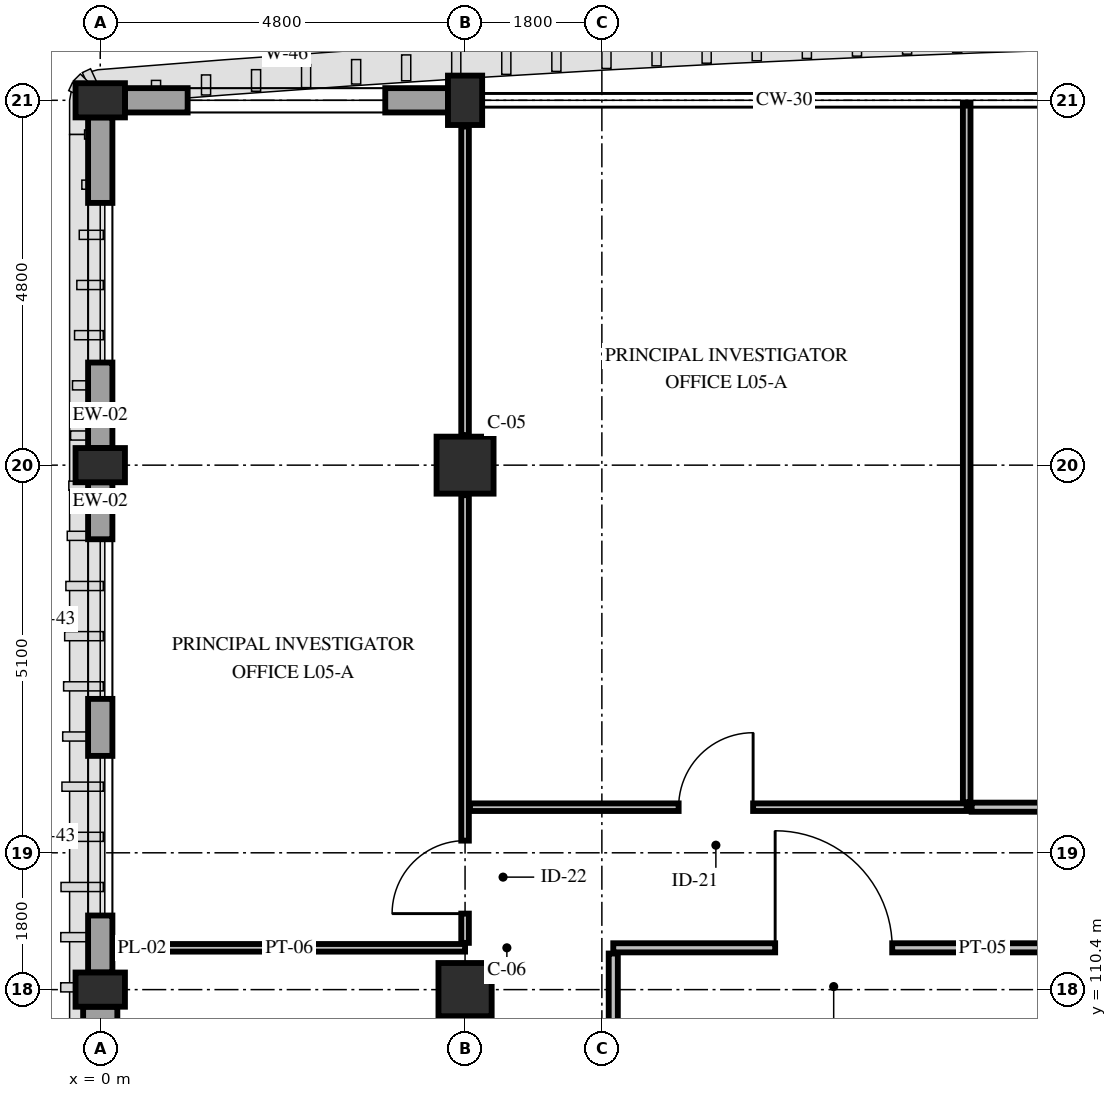
"""IFC4 building model, lengths in metres.
Left out: names, types, materials, properties, quantities, classifications, styles, units other than length and angle.
Written with IfcOpenShell. Run it as: python <this file> out.ifc"""

import sys

from ifc_helpers import new_model, si_unit, direction, frame, frame_2d, origin, origin_2d, place, context, subcontext, project, spatial, rectangle, extrude, element, fill, save


model = new_model("IFC4")
c1 = context("Model", 3, precision=1e-05, world=origin(), true_north=direction((0.0, 1.0)))
c2 = subcontext(c1, "Body", "Model", "MODEL_VIEW")
j1 = project(units=[si_unit("LENGTHUNIT", "METRE"), si_unit("PLANEANGLEUNIT", "RADIAN")], contexts=[c1])
p1 = place(None, origin())
s1 = spatial("IfcSite", under=j1, at=p1, CompositionType="ELEMENT")
p2 = place(p1, origin())
s2 = spatial("IfcBuilding", under=s1, at=p2, CompositionType="ELEMENT")
p3 = place(p2, frame((0.0, 0.0, 24.6)))
s3 = spatial("IfcBuildingStorey", under=s2, at=p3, CompositionType="ELEMENT", Elevation=24.6)
for number, where, z_axis, x_axis in (
    (1, (0.0, 110.4, 0.0), (0.0, 0.0, 1.0), (0.0, 1.0, 0.0)),
    (2, (0.0, 117.3, 0.0), (0.0, 0.0, 1.0), (0.0, 1.0, 0.0)),
    (3, (0.0, 122.1, 0.0), (0.0, 0.0, 1.0), (0.0, 1.0, 0.0)),
):
    element("IfcColumn", number, at=place(p3, frame(where, z_axis=z_axis, x_axis=x_axis)), inside=s3, PredefinedType="PILASTER", context=c2, shape_type="SweptSolid", body=[
        extrude(rectangle(XDim=0.45, YDim=0.65, at=origin_2d()), origin(), (0.0, 0.0, 1.0), 4.8),
    ])
p4 = place(p3, frame((4.8, 110.4, 0.0), z_axis=(0.0, 0.0, 1.0), x_axis=(1.0, 0.0, 0.0)))
e4 = element("IfcColumn", 4, at=p4, inside=s3, PredefinedType="COLUMN", context=c2, shape_type="SweptSolid", body=[
    extrude(rectangle(XDim=0.7, YDim=0.7, at=origin_2d()), origin(), (0.0, 0.0, 1.0), 4.8),
])
p5 = place(p3, frame((4.8, 117.3, 0.0), z_axis=(0.0, 0.0, 1.0), x_axis=(1.0, 0.0, 0.0)))
e5 = element("IfcColumn", 5, at=p5, inside=s3, PredefinedType="COLUMN", context=c2, shape_type="SweptSolid", body=[
    extrude(rectangle(XDim=0.75, YDim=0.75, at=origin_2d()), origin(), (0.0, 0.0, 1.0), 4.8),
])
p6 = place(p3, frame((4.8, 122.1, 0.0), z_axis=(0.0, 0.0, 1.0), x_axis=(1.0, 0.0, 0.0)))
e6 = element("IfcColumn", 6, at=p6, inside=s3, PredefinedType="PILASTER", context=c2, shape_type="SweptSolid", body=[
    extrude(rectangle(XDim=0.45, YDim=0.65, at=origin_2d()), origin(), (0.0, 0.0, 1.0), 4.8),
])
p7 = place(p3, frame((0.0, 104.025, 0.0), z_axis=(0.0, 0.0, 1.0), x_axis=(0.0, 1.0, 0.0)))
e7 = element("IfcWall", 7, at=p7, inside=s3, PredefinedType="SOLIDWALL", context=c2, shape_type="SweptSolid", body=[
    extrude(rectangle(XDim=6.15, YDim=0.45, at=frame_2d((3.075, 0.0))), origin(), (0.0, 0.0, 1.0), 3.95),
])
p8 = place(p3, frame((0.0, 110.625, 0.0), z_axis=(0.0, 0.0, 1.0), x_axis=(0.0, 1.0, 0.0)))
e8 = element("IfcWall", 8, at=p8, inside=s3, PredefinedType="STANDARD", context=c2, shape_type="SweptSolid", body=[
    extrude(rectangle(XDim=6.45, YDim=0.32, at=frame_2d((3.225, 0.0))), origin(), (0.0, 0.0, 1.0), 3.95),
])
p9 = place(p8, frame((0.75, 0.0, 0.85)))
e9 = element("IfcOpeningElement", 9, at=p9, cuts=e8, PredefinedType="OPENING", context=c2, shape_type="SweptSolid", body=[
    extrude(rectangle(XDim=2.1, YDim=2.08, at=frame_2d((1.05, 1.04))), frame((0.0, 0.175, 0.0), z_axis=(0.0, -1.0, 0.0), x_axis=(1.0, 0.0, 0.0)), (0.0, 0.0, 1.0), 0.35),
])
p10 = place(p8, frame((3.6, 0.0, 0.85)))
e10 = element("IfcOpeningElement", 10, at=p10, cuts=e8, PredefinedType="OPENING", context=c2, shape_type="SweptSolid", body=[
    extrude(rectangle(XDim=2.1, YDim=2.08, at=frame_2d((1.05, 1.04))), frame((0.0, 0.175, 0.0), z_axis=(0.0, -1.0, 0.0), x_axis=(1.0, 0.0, 0.0)), (0.0, 0.0, 1.0), 0.35),
])
p11 = place(p3, frame((0.0, 117.525, 0.0), z_axis=(0.0, 0.0, 1.0), x_axis=(0.0, 1.0, 0.0)))
e11 = element("IfcWall", 11, at=p11, inside=s3, PredefinedType="STANDARD", context=c2, shape_type="SweptSolid", body=[
    extrude(rectangle(XDim=4.35, YDim=0.32, at=frame_2d((2.175, 0.0))), origin(), (0.0, 0.0, 1.0), 3.95),
])
p12 = place(p11, frame((1.125, 0.0, 0.85)))
e12 = element("IfcOpeningElement", 12, at=p12, cuts=e11, PredefinedType="OPENING", context=c2, shape_type="SweptSolid", body=[
    extrude(rectangle(XDim=2.1, YDim=2.08, at=frame_2d((1.05, 1.04))), frame((0.0, 0.175, 0.0), z_axis=(0.0, -1.0, 0.0), x_axis=(1.0, 0.0, 0.0)), (0.0, 0.0, 1.0), 0.35),
])
p13 = place(p3, frame((0.325, 122.1, 0.0), z_axis=(0.0, 0.0, 1.0), x_axis=(1.0, 0.0, 0.0)))
e13 = element("IfcWall", 13, at=p13, inside=s3, PredefinedType="STANDARD", context=c2, shape_type="SweptSolid", body=[
    extrude(rectangle(XDim=4.25, YDim=0.32, at=frame_2d((2.125, 0.0))), origin(), (0.0, 0.0, 1.0), 3.95),
])
p14 = place(p13, frame((0.825, 0.0, 0.85)))
e14 = element("IfcOpeningElement", 14, at=p14, cuts=e13, PredefinedType="OPENING", context=c2, shape_type="SweptSolid", body=[
    extrude(rectangle(XDim=2.6, YDim=2.08, at=frame_2d((1.3, 1.04))), frame((0.0, 0.175, 0.0), z_axis=(0.0, -1.0, 0.0), x_axis=(1.0, 0.0, 0.0)), (0.0, 0.0, 1.0), 0.35),
])
p15 = place(p3, frame((6.75, 110.95, 0.0), z_axis=(0.0, 0.0, 1.0), x_axis=(1.0, 0.0, 0.0)))
e15 = element("IfcWall", 15, at=p15, inside=s3, PredefinedType="PARTITIONING", context=c2, shape_type="SweptSolid", body=[
    extrude(rectangle(XDim=5.8, YDim=0.12, at=frame_2d((2.9, 0.0))), origin(), (0.0, 0.0, 1.0), 4.345),
])
p16 = place(p15, frame((2.13, 0.0, 0.0)))
e16 = element("IfcOpeningElement", 16, at=p16, cuts=e15, PredefinedType="OPENING", context=c2, shape_type="SweptSolid", body=[
    extrude(rectangle(XDim=1.54, YDim=2.25, at=frame_2d((0.77, 1.125))), frame((0.0, 0.075, 0.0), z_axis=(0.0, -1.0, 0.0), x_axis=(1.0, 0.0, 0.0)), (0.0, 0.0, 1.0), 0.15),
])
p17 = place(p3, frame((6.75, 104.575, 0.0), z_axis=(0.0, 0.0, 1.0), x_axis=(0.0, 1.0, 0.0)))
e17 = element("IfcWall", 17, at=p17, inside=s3, PredefinedType="PARTITIONING", context=c2, shape_type="SweptSolid", body=[
    extrude(rectangle(XDim=6.3, YDim=0.12, at=frame_2d((3.15, 0.0))), origin(), (0.0, 0.0, 1.0), 3.83),
])
p18 = place(p3, frame((0.175, 110.95, 0.0), z_axis=(0.0, 0.0, 1.0), x_axis=(1.0, 0.0, 0.0)))
e18 = element("IfcWall", 18, at=p18, inside=s3, PredefinedType="PARTITIONING", context=c2, shape_type="SweptSolid", body=[
    extrude(rectangle(XDim=4.625, YDim=0.1, at=frame_2d((2.312, 0.0))), origin(), (0.0, 0.0, 1.0), 4.08),
])
p19 = place(p3, frame((4.8, 111.015, 0.0), z_axis=(0.0, 0.0, 1.0), x_axis=(0.0, 1.0, 0.0)))
e19 = element("IfcWall", 19, at=p19, inside=s3, PredefinedType="PARTITIONING", context=c2, shape_type="SweptSolid", body=[
    extrude(rectangle(XDim=5.89, YDim=0.1, at=frame_2d((2.945, 0.0))), origin(), (0.0, 0.0, 1.0), 4.13),
])
p20 = place(p19, frame((0.385, 0.0, 0.0)))
e20 = element("IfcOpeningElement", 20, at=p20, cuts=e19, PredefinedType="OPENING", context=c2, shape_type="SweptSolid", body=[
    extrude(rectangle(XDim=0.96, YDim=2.15, at=frame_2d((0.48, 1.075))), frame((0.0, 0.065, 0.0), z_axis=(0.0, -1.0, 0.0), x_axis=(1.0, 0.0, 0.0)), (0.0, 0.0, 1.0), 0.13),
])
p21 = place(p3, frame((4.8, 117.695, 0.0), z_axis=(0.0, 0.0, 1.0), x_axis=(0.0, 1.0, 0.0)))
e21 = element("IfcWall", 21, at=p21, inside=s3, PredefinedType="PARTITIONING", context=c2, shape_type="SweptSolid", body=[
    extrude(rectangle(XDim=4.06, YDim=0.1, at=frame_2d((2.03, 0.0))), origin(), (0.0, 0.0, 1.0), 4.13),
])
p22 = place(p3, frame((4.865, 112.8, 0.0), z_axis=(0.0, 0.0, 1.0), x_axis=(1.0, 0.0, 0.0)))
e22 = element("IfcWall", 22, at=p22, inside=s3, PredefinedType="PARTITIONING", context=c2, shape_type="SweptSolid", body=[
    extrude(rectangle(XDim=6.535, YDim=0.1, at=frame_2d((3.268, 0.0))), origin(), (0.0, 0.0, 1.0), 4.13),
])
p23 = place(p22, frame((2.745, 0.0, 0.0)))
e23 = element("IfcOpeningElement", 23, at=p23, cuts=e22, PredefinedType="OPENING", context=c2, shape_type="SweptSolid", body=[
    extrude(rectangle(XDim=0.98, YDim=2.2, at=frame_2d((0.49, 1.1))), frame((0.0, 0.065, 0.0), z_axis=(0.0, -1.0, 0.0), x_axis=(1.0, 0.0, 0.0)), (0.0, 0.0, 1.0), 0.13),
])
p24 = place(p3, frame((11.4, 112.865, 0.0), z_axis=(0.0, 0.0, 1.0), x_axis=(0.0, 1.0, 0.0)))
e24 = element("IfcWall", 24, at=p24, inside=s3, PredefinedType="PARTITIONING", context=c2, shape_type="SweptSolid", body=[
    extrude(rectangle(XDim=9.195, YDim=0.1, at=frame_2d((4.598, 0.0))), origin(), (0.0, 0.0, 1.0), 3.83),
])
p25 = place(p3, frame((11.465, 112.8, 0.0), z_axis=(0.0, 0.0, 1.0), x_axis=(1.0, 0.0, 0.0)))
e25 = element("IfcWall", 25, at=p25, inside=s3, PredefinedType="PARTITIONING", context=c2, shape_type="SweptSolid", body=[
    extrude(rectangle(XDim=11.735, YDim=0.12, at=frame_2d((5.867, 0.0))), origin(), (0.0, 0.0, 1.0), 4.13),
])
p26 = place(p25, frame((5.205, 0.0, 0.0)))
e26 = element("IfcOpeningElement", 26, at=p26, cuts=e25, PredefinedType="OPENING", context=c2, shape_type="SweptSolid", body=[
    extrude(rectangle(XDim=1.26, YDim=2.2, at=frame_2d((0.63, 1.1))), frame((0.0, 0.075, 0.0), z_axis=(0.0, -1.0, 0.0), x_axis=(1.0, 0.0, 0.0)), (0.0, 0.0, 1.0), 0.15),
])
p27 = place(p9, origin())
e27 = element("IfcWindow", 27, at=p27, inside=s3, PartitioningType="DOUBLE_PANEL_VERTICAL", PredefinedType="WINDOW", context=c2, shape_type="SweptSolid", body=[
    extrude(rectangle(XDim=2.1, YDim=2.08, at=frame_2d((1.05, 1.04))), frame((0.0, 0.03, 0.0), z_axis=(0.0, -1.0, 0.0), x_axis=(1.0, 0.0, 0.0)), (0.0, 0.0, 1.0), 0.06),
])
fill(e9, e27)
p28 = place(p10, origin())
e28 = element("IfcWindow", 28, at=p28, inside=s3, PartitioningType="DOUBLE_PANEL_VERTICAL", PredefinedType="WINDOW", context=c2, shape_type="SweptSolid", body=[
    extrude(rectangle(XDim=2.1, YDim=2.08, at=frame_2d((1.05, 1.04))), frame((0.0, 0.03, 0.0), z_axis=(0.0, -1.0, 0.0), x_axis=(1.0, 0.0, 0.0)), (0.0, 0.0, 1.0), 0.06),
])
fill(e10, e28)
p29 = place(p12, origin())
e29 = element("IfcWindow", 29, at=p29, inside=s3, PartitioningType="DOUBLE_PANEL_VERTICAL", PredefinedType="WINDOW", context=c2, shape_type="SweptSolid", body=[
    extrude(rectangle(XDim=2.1, YDim=2.08, at=frame_2d((1.05, 1.04))), frame((0.0, 0.03, 0.0), z_axis=(0.0, -1.0, 0.0), x_axis=(1.0, 0.0, 0.0)), (0.0, 0.0, 1.0), 0.06),
])
fill(e12, e29)
p30 = place(p14, origin())
e30 = element("IfcWindow", 30, at=p30, inside=s3, PartitioningType="DOUBLE_PANEL_VERTICAL", PredefinedType="WINDOW", context=c2, shape_type="SweptSolid", body=[
    extrude(rectangle(XDim=2.6, YDim=2.08, at=frame_2d((1.3, 1.04))), frame((0.0, 0.03, 0.0), z_axis=(0.0, -1.0, 0.0), x_axis=(1.0, 0.0, 0.0)), (0.0, 0.0, 1.0), 0.06),
])
fill(e14, e30)
p31 = place(p16, origin())
e31 = element("IfcDoor", 31, at=p31, inside=s3, OperationType="SINGLE_SWING_LEFT", PredefinedType="DOOR", context=c2, shape_type="SweptSolid", body=[
    extrude(rectangle(XDim=1.54, YDim=2.25, at=frame_2d((0.77, 1.125))), frame((0.0, 0.025, 0.0), z_axis=(0.0, -1.0, 0.0), x_axis=(1.0, 0.0, 0.0)), (0.0, 0.0, 1.0), 0.05),
])
fill(e16, e31)
p32 = place(p20, origin())
e32 = element("IfcDoor", 32, at=p32, inside=s3, OperationType="SINGLE_SWING_LEFT", PredefinedType="DOOR", context=c2, shape_type="SweptSolid", body=[
    extrude(rectangle(XDim=0.96, YDim=2.15, at=frame_2d((0.48, 1.075))), frame((0.0, 0.025, 0.0), z_axis=(0.0, -1.0, 0.0), x_axis=(1.0, 0.0, 0.0)), (0.0, 0.0, 1.0), 0.05),
])
fill(e20, e32)
p33 = place(p23, origin())
e33 = element("IfcDoor", 33, at=p33, inside=s3, OperationType="SINGLE_SWING_RIGHT", PredefinedType="DOOR", context=c2, shape_type="SweptSolid", body=[
    extrude(rectangle(XDim=0.98, YDim=2.2, at=frame_2d((0.49, 1.1))), frame((0.0, 0.025, 0.0), z_axis=(0.0, -1.0, 0.0), x_axis=(1.0, 0.0, 0.0)), (0.0, 0.0, 1.0), 0.05),
])
fill(e23, e33)
save(model, sys.argv[1])
